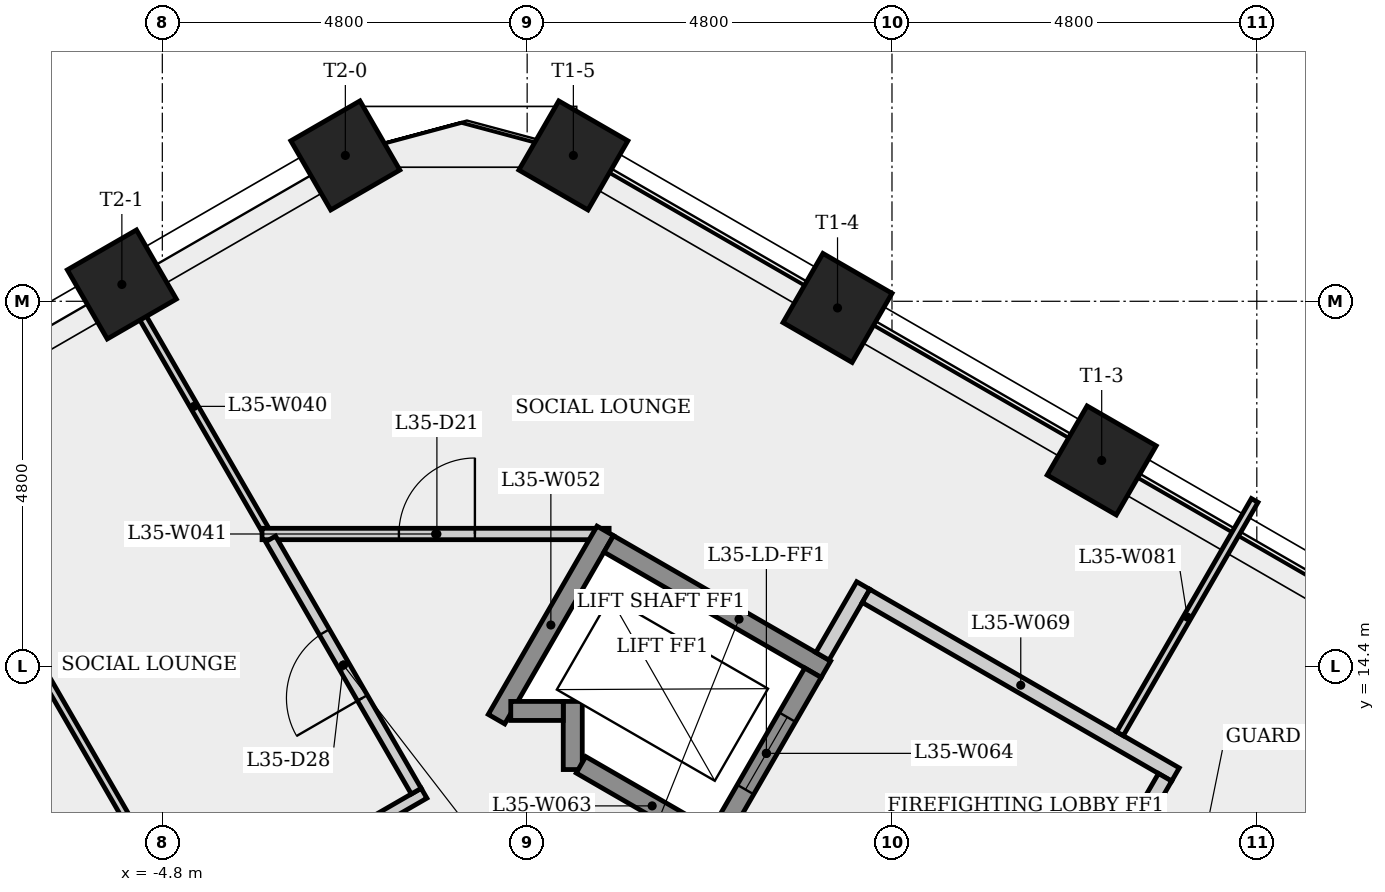
"""IFC4 building model, lengths in metres.
Left out: names, types, materials, properties, quantities, classifications, styles, units other than length and angle.
Written with IfcOpenShell. Run it as: python <this file> out.ifc"""

import sys

from ifc_helpers import new_model, si_unit, direction, frame, frame_2d, origin, origin_2d, place, context, subcontext, project, spatial, rectangle, extrude, element, fill, save


model = new_model("IFC4")
c1 = context("Model", 3, precision=1e-05, world=origin(), true_north=direction((0.0, 1.0)))
c2 = subcontext(c1, "Body", "Model", "MODEL_VIEW")
j1 = project(units=[si_unit("LENGTHUNIT", "METRE"), si_unit("PLANEANGLEUNIT", "RADIAN")], contexts=[c1])
p1 = place(None, origin())
s1 = spatial("IfcSite", under=j1, at=p1, CompositionType="ELEMENT")
p2 = place(p1, origin())
s2 = spatial("IfcBuilding", under=s1, at=p2, CompositionType="ELEMENT")
p3 = place(p2, frame((0.0, 0.0, 132.5)))
s3 = spatial("IfcBuildingStorey", under=s2, at=p3, CompositionType="ELEMENT", Elevation=132.5)
for number, where, z_axis, x_axis in (
    (1, (7.559, 17.106, 0.0), (0.0, 0.0, 1.0), (0.5, 0.866, 0.0)),
    (2, (4.083, 19.112, 0.0), (0.0, 0.0, 1.0), (0.5, 0.866, 0.0)),
    (3, (0.608, 21.119, 0.0), (0.0, 0.0, 1.0), (0.5, 0.866, 0.0)),
    (4, (-2.392, 21.119, 0.0), (0.0, 0.0, 1.0), (-0.5, 0.866, 0.0)),
    (5, (-5.332, 19.421, 0.0), (0.0, 0.0, 1.0), (-0.5, 0.866, 0.0)),
):
    element("IfcColumn", number, at=place(p3, frame(where, z_axis=z_axis, x_axis=x_axis)), inside=s3, PredefinedType="COLUMN", context=c2, shape_type="SweptSolid", body=[
        extrude(rectangle(XDim=1.05, YDim=1.05, at=origin_2d()), origin(), (0.0, 0.0, 1.0), 3.4),
    ])
p4 = place(p3, frame((-10.213, 7.613, 0.0), z_axis=(0.0, 0.0, 1.0), x_axis=(0.866020604402, 0.500008312683, 0.0)))
e6 = element("IfcWall", 6, at=p4, inside=s3, PredefinedType="PARTITIONING", context=c2, shape_type="SweptSolid", body=[
    extrude(rectangle(XDim=10.227, YDim=0.15, at=frame_2d((5.113, 0.0))), origin(), (0.0, 0.0, 1.0), 3.0),
])
p5 = place(p4, frame((2.822, 0.0, 0.0)))
e7 = element("IfcOpeningElement", 7, at=p5, cuts=e6, PredefinedType="OPENING", context=c2, shape_type="SweptSolid", body=[
    extrude(rectangle(XDim=1.0, YDim=2.1, at=frame_2d((0.5, 1.05))), frame((0.0, 0.085, 0.0), z_axis=(0.0, -1.0, 0.0), x_axis=(1.0, 0.0, 0.0)), (0.0, 0.0, 1.0), 0.17),
])
p6 = place(p3, frame((-4.47, 11.016, 0.0), z_axis=(0.0, 0.0, 1.0), x_axis=(-0.499997453958, 0.866026873738, 0.0)))
e8 = element("IfcWall", 8, at=p6, inside=s3, PredefinedType="PARTITIONING", context=c2, shape_type="SweptSolid", body=[
    extrude(rectangle(XDim=7.71, YDim=0.1, at=frame_2d((3.855, 0.0))), origin(), (0.0, 0.0, 1.0), 3.0),
])
p7 = place(p3, frame((-3.45, 16.203, 0.0), z_axis=(0.0, 0.0, 1.0), x_axis=(-0.499977539641, 0.866038370891, 0.0)))
e9 = element("IfcWall", 9, at=p7, inside=s3, PredefinedType="PARTITIONING", context=c2, shape_type="SweptSolid", body=[
    extrude(rectangle(XDim=3.728, YDim=0.1, at=frame_2d((1.864, 0.0))), origin(), (0.0, 0.0, 1.0), 3.0),
])
p8 = place(p3, frame((-3.488, 16.138, 0.0), z_axis=(0.0, 0.0, 1.0), x_axis=(1.0, 0.0, 0.0)))
e10 = element("IfcWall", 10, at=p8, inside=s3, PredefinedType="PARTITIONING", context=c2, shape_type="SweptSolid", body=[
    extrude(rectangle(XDim=4.566, YDim=0.15, at=frame_2d((2.283, 0.0))), origin(), (0.0, 0.0, 1.0), 3.0),
])
p9 = place(p8, frame((1.801, 0.0, 0.0)))
e11 = element("IfcOpeningElement", 11, at=p9, cuts=e10, PredefinedType="OPENING", context=c2, shape_type="SweptSolid", body=[
    extrude(rectangle(XDim=1.0, YDim=2.1, at=frame_2d((0.5, 1.05))), frame((0.0, 0.085, 0.0), z_axis=(0.0, -1.0, 0.0), x_axis=(1.0, 0.0, 0.0)), (0.0, 0.0, 1.0), 0.17),
])
p10 = place(p3, frame((-1.459, 12.754, 0.0), z_axis=(0.0, 0.0, 1.0), x_axis=(-0.500023910398, 0.866011598669, 0.0)))
e12 = element("IfcWall", 12, at=p10, inside=s3, PredefinedType="PARTITIONING", context=c2, shape_type="SweptSolid", body=[
    extrude(rectangle(XDim=3.832, YDim=0.15, at=frame_2d((1.916, 0.0))), origin(), (0.0, 0.0, 1.0), 3.0),
])
p11 = place(p10, frame((1.416, 0.0, 0.0)))
e13 = element("IfcOpeningElement", 13, at=p11, cuts=e12, PredefinedType="OPENING", context=c2, shape_type="SweptSolid", body=[
    extrude(rectangle(XDim=1.0, YDim=2.1, at=frame_2d((0.5, 1.05))), frame((0.0, 0.085, 0.0), z_axis=(0.0, -1.0, 0.0), x_axis=(1.0, 0.0, 0.0)), (0.0, 0.0, 1.0), 0.17),
])
p12 = place(p3, frame((-0.403, 13.702, 0.0), z_axis=(0.0, 0.0, 1.0), x_axis=(0.499976111731, 0.866039195244, 0.0)))
e14 = element("IfcWall", 14, at=p12, inside=s3, PredefinedType="SHEAR", context=c2, shape_type="SweptSolid", body=[
    extrude(rectangle(XDim=2.861, YDim=0.25, at=frame_2d((1.43, 0.0))), origin(), (0.0, 0.0, 1.0), 3.0),
])
p13 = place(p3, frame((0.6, 13.039, 0.0), z_axis=(0.0, 0.0, 1.0), x_axis=(0.0, 1.0, 0.0)))
e15 = element("IfcWall", 15, at=p13, inside=s3, PredefinedType="SHEAR", context=c2, shape_type="SweptSolid", body=[
    extrude(rectangle(XDim=0.896, YDim=0.25, at=frame_2d((0.448, 0.0))), origin(), (0.0, 0.0, 1.0), 3.0),
])
p14 = place(p3, frame((0.475, 13.81, 0.0), z_axis=(0.0, 0.0, 1.0), x_axis=(-1.0, 0.0, 0.0)))
e16 = element("IfcWall", 16, at=p14, inside=s3, PredefinedType="SHEAR", context=c2, shape_type="SweptSolid", body=[
    extrude(rectangle(XDim=0.691, YDim=0.25, at=frame_2d((0.345, 0.0))), origin(), (0.0, 0.0, 1.0), 3.4),
])
p15 = place(p3, frame((1.073, 16.008, 0.0), z_axis=(0.0, 0.0, 1.0), x_axis=(0.866040211805, -0.499974350878, 0.0)))
e17 = element("IfcWall", 17, at=p15, inside=s3, PredefinedType="SHEAR", context=c2, shape_type="SweptSolid", body=[
    extrude(rectangle(XDim=3.3, YDim=0.25, at=frame_2d((1.65, 0.0))), origin(), (0.0, 0.0, 1.0), 3.0),
])
p16 = place(p3, frame((2.581, 12.02, 0.0), z_axis=(0.0, 0.0, 1.0), x_axis=(-0.86603892542, 0.499976579108, 0.0)))
e18 = element("IfcWall", 18, at=p16, inside=s3, PredefinedType="SHEAR", context=c2, shape_type="SweptSolid", body=[
    extrude(rectangle(XDim=2.162, YDim=0.25, at=frame_2d((1.081, 0.0))), origin(), (0.0, 0.0, 1.0), 3.0),
])
p17 = place(p3, frame((2.535, 12.191, 0.0), z_axis=(0.0, 0.0, 1.0), x_axis=(0.500061746146, 0.865989751695, 0.0)))
e19 = element("IfcWall", 19, at=p17, inside=s3, PredefinedType="SHEAR", context=c2, shape_type="SweptSolid", body=[
    extrude(rectangle(XDim=2.45, YDim=0.25, at=frame_2d((1.225, 0.0))), origin(), (0.0, 0.0, 1.0), 3.4),
])
p18 = place(p17, frame((0.675, 0.0, 0.0)))
e20 = element("IfcOpeningElement", 20, at=p18, cuts=e19, PredefinedType="OPENING", context=c2, shape_type="SweptSolid", body=[
    extrude(rectangle(XDim=1.1, YDim=2.1, at=frame_2d((0.55, 1.05))), frame((0.0, 0.135, 0.0), z_axis=(0.0, -1.0, 0.0), x_axis=(1.0, 0.0, 0.0)), (0.0, 0.0, 1.0), 0.27),
])
p19 = place(p3, frame((3.885, 14.529, 0.0), z_axis=(0.0, 0.0, 1.0), x_axis=(0.499997628298, 0.866026773083, 0.0)))
e21 = element("IfcWall", 21, at=p19, inside=s3, PredefinedType="PARTITIONING", context=c2, shape_type="SweptSolid", body=[
    extrude(rectangle(XDim=1.075, YDim=0.2, at=frame_2d((0.538, 0.0))), origin(), (0.0, 0.0, 1.0), 3.0),
])
p20 = place(p3, frame((4.459, 15.323, 0.0), z_axis=(0.0, 0.0, 1.0), x_axis=(0.866016039709, -0.500016218704, 0.0)))
e22 = element("IfcWall", 22, at=p20, inside=s3, PredefinedType="PARTITIONING", context=c2, shape_type="SweptSolid", body=[
    extrude(rectangle(XDim=4.7, YDim=0.2, at=frame_2d((2.35, 0.0))), origin(), (0.0, 0.0, 1.0), 3.0),
])
p21 = place(p3, frame((6.48, 9.624, 0.0), z_axis=(0.0, 0.0, 1.0), x_axis=(0.500017246033, 0.866015446554, 0.0)))
e23 = element("IfcWall", 23, at=p21, inside=s3, PredefinedType="SHEAR", context=c2, shape_type="SweptSolid", body=[
    extrude(rectangle(XDim=3.25, YDim=0.25, at=frame_2d((1.625, 0.0))), origin(), (0.0, 0.0, 1.0), 3.0),
])
p22 = place(p21, frame((1.125, 0.0, 0.0)))
e24 = element("IfcOpeningElement", 24, at=p22, cuts=e23, PredefinedType="OPENING", context=c2, shape_type="SweptSolid", body=[
    extrude(rectangle(XDim=1.0, YDim=2.1, at=frame_2d((0.5, 1.05))), frame((0.0, 0.135, 0.0), z_axis=(0.0, -1.0, 0.0), x_axis=(1.0, 0.0, 0.0)), (0.0, 0.0, 1.0), 0.27),
])
p23 = place(p3, frame((7.8, 13.51, 0.0), z_axis=(0.0, 0.0, 1.0), x_axis=(0.499976875499, 0.866038754309, 0.0)))
e25 = element("IfcWall", 25, at=p23, inside=s3, PredefinedType="PARTITIONING", context=c2, shape_type="SweptSolid", body=[
    extrude(rectangle(XDim=3.544, YDim=0.1, at=frame_2d((1.772, 0.0))), origin(), (0.0, 0.0, 1.0), 3.0),
])
p24 = place(p3, frame((8.393, 12.937, 0.0), z_axis=(0.0, 0.0, 1.0), x_axis=(-0.500065409566, -0.86598763626, 0.0)))
e26 = element("IfcWall", 26, at=p24, inside=s3, PredefinedType="PARTITIONING", context=c2, shape_type="SweptSolid", body=[
    extrude(rectangle(XDim=0.575, YDim=0.2, at=frame_2d((0.288, 0.0))), origin(), (0.0, 0.0, 1.0), 3.0),
])
p25 = place(p18, origin())
e27 = element("IfcDoor", 27, at=p25, inside=s3, OperationType="SLIDING_TO_LEFT", PredefinedType="DOOR", context=c2, shape_type="SweptSolid", body=[
    extrude(rectangle(XDim=1.1, YDim=2.1, at=frame_2d((0.55, 1.05))), frame((0.0, 0.025, 0.0), z_axis=(0.0, -1.0, 0.0), x_axis=(1.0, 0.0, 0.0)), (0.0, 0.0, 1.0), 0.05),
])
fill(e20, e27)
p26 = place(p9, origin())
e28 = element("IfcDoor", 28, at=p26, inside=s3, OperationType="SINGLE_SWING_RIGHT", PredefinedType="DOOR", context=c2, shape_type="SweptSolid", body=[
    extrude(rectangle(XDim=1.0, YDim=2.1, at=frame_2d((0.5, 1.05))), frame((0.0, 0.025, 0.0), z_axis=(0.0, -1.0, 0.0), x_axis=(1.0, 0.0, 0.0)), (0.0, 0.0, 1.0), 0.05),
])
fill(e11, e28)
p27 = place(p11, origin())
e29 = element("IfcDoor", 29, at=p27, inside=s3, OperationType="SINGLE_SWING_LEFT", PredefinedType="DOOR", context=c2, shape_type="SweptSolid", body=[
    extrude(rectangle(XDim=1.0, YDim=2.1, at=frame_2d((0.5, 1.05))), frame((0.0, 0.025, 0.0), z_axis=(0.0, -1.0, 0.0), x_axis=(1.0, 0.0, 0.0)), (0.0, 0.0, 1.0), 0.05),
])
fill(e13, e29)
save(model, sys.argv[1])
